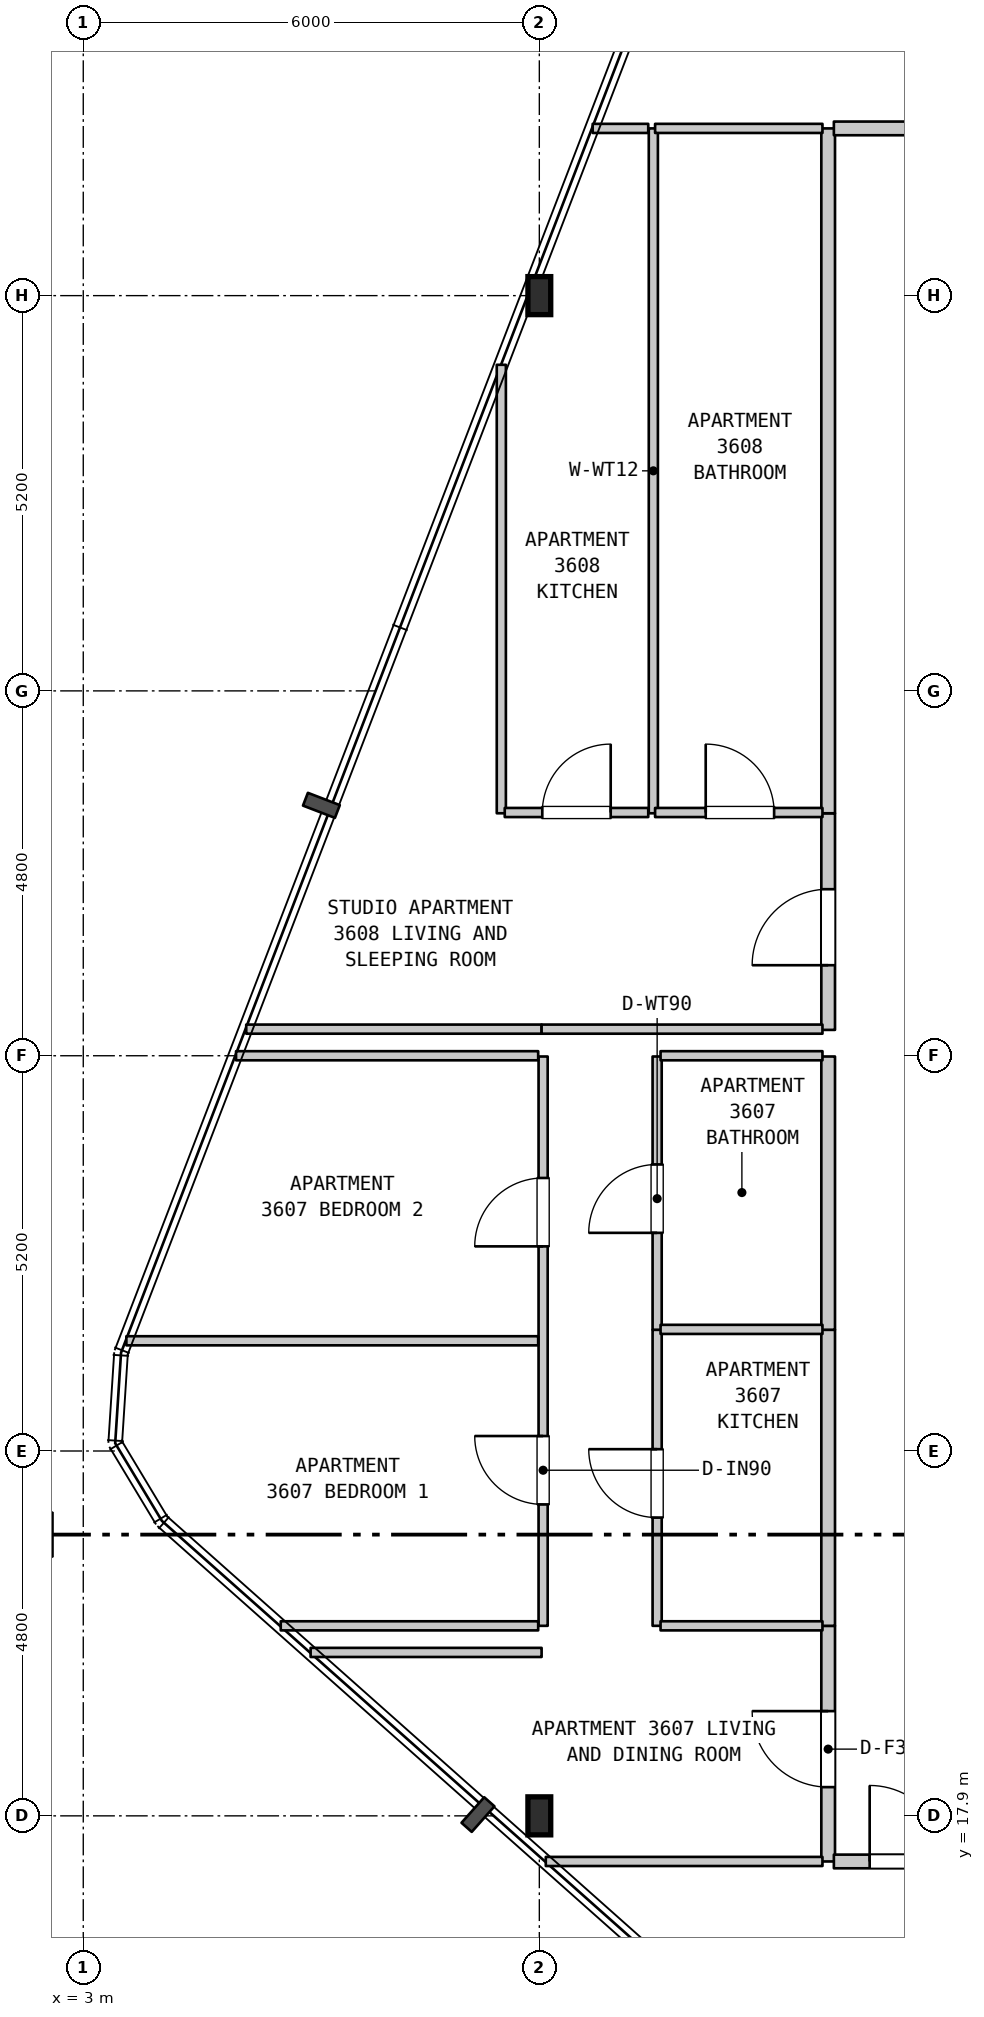
"""IFC4 building model, lengths in metres.
Left out: names, types, materials, properties, quantities, classifications, styles, units other than length and angle.
Written with IfcOpenShell. Run it as: python <this file> out.ifc"""

import sys

from ifc_helpers import new_model, si_unit, direction, frame, frame_2d, origin, origin_2d, place, context, subcontext, project, spatial, rectangle, i_section, extrude, element, fill, save


model = new_model("IFC4")
c1 = context("Model", 3, precision=1e-05, world=origin(), true_north=direction((0.0, 1.0)))
c2 = subcontext(c1, "Body", "Model", "MODEL_VIEW")
j1 = project(units=[si_unit("LENGTHUNIT", "METRE"), si_unit("PLANEANGLEUNIT", "RADIAN")], contexts=[c1])
p1 = place(None, origin())
s1 = spatial("IfcSite", under=j1, at=p1, CompositionType="ELEMENT")
p2 = place(p1, origin())
s2 = spatial("IfcBuilding", under=s1, at=p2, CompositionType="ELEMENT")
p3 = place(p2, frame((0.0, 0.0, 148.3)))
s3 = spatial("IfcBuildingStorey", under=s2, at=p3, CompositionType="ELEMENT", Elevation=148.3)
for number, where, z_axis, x_axis in (
    (1, (9.0, 17.9, 0.0), (0.0, 0.0, 1.0), (1.0, 0.0, 0.0)),
    (2, (9.0, 37.9, 0.0), (0.0, 0.0, 1.0), (1.0, 0.0, 0.0)),
):
    element("IfcColumn", number, at=place(p3, frame(where, z_axis=z_axis, x_axis=x_axis)), inside=s3, PredefinedType="COLUMN", context=c2, shape_type="SweptSolid", body=[
        extrude(i_section(OverallWidth=0.3, OverallDepth=0.5, WebThickness=0.014, FlangeThickness=0.028, FilletRadius=0.027, at=origin_2d()), origin(), (0.0, 0.0, 1.0), 3.7),
    ])
p4 = place(p3, frame((8.5, 31.09, 0.0), z_axis=(0.0, 0.0, 1.0), x_axis=(0.0, 1.0, 0.0)))
e3 = element("IfcWall", 3, at=p4, inside=s3, PredefinedType="PARTITIONING", context=c2, shape_type="SweptSolid", body=[
    extrude(rectangle(XDim=5.9, YDim=0.12, at=frame_2d((2.95, 0.0))), origin(), (0.0, 0.0, 1.0), 3.385),
])
p5 = place(p3, frame((9.05, 20.4, 0.0), z_axis=(0.0, 0.0, 1.0), x_axis=(0.0, 1.0, 0.0)))
e4 = element("IfcWall", 4, at=p5, inside=s3, PredefinedType="PARTITIONING", context=c2, shape_type="SweptSolid", body=[
    extrude(rectangle(XDim=7.49, YDim=0.12, at=frame_2d((3.745, 0.0))), origin(), (0.0, 0.0, 1.0), 2.785),
])
p6 = place(p5, frame((1.597, 0.0, 0.0)))
e5 = element("IfcOpeningElement", 5, at=p6, cuts=e4, PredefinedType="OPENING", context=c2, shape_type="SweptSolid", body=[
    extrude(rectangle(XDim=0.9, YDim=2.15, at=frame_2d((0.45, 1.075))), frame((0.0, 0.07, 0.0), z_axis=(0.0, -1.0, 0.0), x_axis=(1.0, 0.0, 0.0)), (0.0, 0.0, 1.0), 0.14),
])
p7 = place(p5, frame((4.992, 0.0, 0.0)))
e6 = element("IfcOpeningElement", 6, at=p7, cuts=e4, PredefinedType="OPENING", context=c2, shape_type="SweptSolid", body=[
    extrude(rectangle(XDim=0.9, YDim=2.15, at=frame_2d((0.45, 1.075))), frame((0.0, 0.07, 0.0), z_axis=(0.0, -1.0, 0.0), x_axis=(1.0, 0.0, 0.0)), (0.0, 0.0, 1.0), 0.14),
])
p8 = place(p3, frame((10.5, 31.09, 0.0), z_axis=(0.0, 0.0, 1.0), x_axis=(0.0, 1.0, 0.0)))
e7 = element("IfcWall", 7, at=p8, inside=s3, PredefinedType="PARTITIONING", context=c2, shape_type="SweptSolid", body=[
    extrude(rectangle(XDim=9.01, YDim=0.12, at=frame_2d((4.505, 0.0))), origin(), (0.0, 0.0, 1.0), 3.385),
])
p9 = place(p3, frame((10.55, 20.4, 0.0), z_axis=(0.0, 0.0, 1.0), x_axis=(0.0, 1.0, 0.0)))
e8 = element("IfcWall", 8, at=p9, inside=s3, PredefinedType="PARTITIONING", context=c2, shape_type="SweptSolid", body=[
    extrude(rectangle(XDim=3.895, YDim=0.12, at=frame_2d((1.948, 0.0))), origin(), (0.0, 0.0, 1.0), 3.385),
])
p10 = place(p9, frame((1.424, 0.0, 0.0)))
e9 = element("IfcOpeningElement", 9, at=p10, cuts=e8, PredefinedType="OPENING", context=c2, shape_type="SweptSolid", body=[
    extrude(rectangle(XDim=0.9, YDim=2.15, at=frame_2d((0.45, 1.075))), frame((0.0, 0.07, 0.0), z_axis=(0.0, -1.0, 0.0), x_axis=(1.0, 0.0, 0.0)), (0.0, 0.0, 1.0), 0.14),
])
p11 = place(p3, frame((10.55, 24.295, 0.0), z_axis=(0.0, 0.0, 1.0), x_axis=(0.0, 1.0, 0.0)))
e10 = element("IfcWall", 10, at=p11, inside=s3, PredefinedType="PARTITIONING", context=c2, shape_type="SweptSolid", body=[
    extrude(rectangle(XDim=3.595, YDim=0.12, at=frame_2d((1.797, 0.0))), origin(), (0.0, 0.0, 1.0), 3.385),
])
p12 = place(p11, frame((1.275, 0.0, 0.0)))
e11 = element("IfcOpeningElement", 11, at=p12, cuts=e10, PredefinedType="OPENING", context=c2, shape_type="SweptSolid", body=[
    extrude(rectangle(XDim=0.9, YDim=2.1, at=frame_2d((0.45, 1.05))), frame((0.0, 0.07, 0.0), z_axis=(0.0, -1.0, 0.0), x_axis=(1.0, 0.0, 0.0)), (0.0, 0.0, 1.0), 0.14),
])
p13 = place(p3, frame((12.8, 17.3, 0.0), z_axis=(0.0, 0.0, 1.0), x_axis=(0.0, 1.0, 0.0)))
e12 = element("IfcWall", 12, at=p13, inside=s3, PredefinedType="STANDARD", context=c2, shape_type="SweptSolid", body=[
    extrude(rectangle(XDim=3.1, YDim=0.18, at=frame_2d((1.55, 0.0))), origin(), (0.0, 0.0, 1.0), 3.385),
])
p14 = place(p13, frame((0.978, 0.0, 0.0)))
e13 = element("IfcOpeningElement", 13, at=p14, cuts=e12, PredefinedType="OPENING", context=c2, shape_type="SweptSolid", body=[
    extrude(rectangle(XDim=1.0, YDim=2.15, at=frame_2d((0.5, 1.075))), frame((0.0, 0.1, 0.0), z_axis=(0.0, -1.0, 0.0), x_axis=(1.0, 0.0, 0.0)), (0.0, 0.0, 1.0), 0.2),
])
p15 = place(p3, frame((12.8, 20.4, 0.0), z_axis=(0.0, 0.0, 1.0), x_axis=(0.0, 1.0, 0.0)))
e14 = element("IfcWall", 14, at=p15, inside=s3, PredefinedType="STANDARD", context=c2, shape_type="SweptSolid", body=[
    extrude(rectangle(XDim=3.895, YDim=0.18, at=frame_2d((1.948, 0.0))), origin(), (0.0, 0.0, 1.0), 3.385),
])
p16 = place(p3, frame((12.8, 24.295, 0.0), z_axis=(0.0, 0.0, 1.0), x_axis=(0.0, 1.0, 0.0)))
e15 = element("IfcWall", 15, at=p16, inside=s3, PredefinedType="STANDARD", context=c2, shape_type="SweptSolid", body=[
    extrude(rectangle(XDim=3.595, YDim=0.18, at=frame_2d((1.797, 0.0))), origin(), (0.0, 0.0, 1.0), 3.385),
])
p17 = place(p3, frame((12.8, 28.24, 0.0), z_axis=(0.0, 0.0, 1.0), x_axis=(0.0, 1.0, 0.0)))
e16 = element("IfcWall", 16, at=p17, inside=s3, PredefinedType="STANDARD", context=c2, shape_type="SweptSolid", body=[
    extrude(rectangle(XDim=2.85, YDim=0.18, at=frame_2d((1.425, 0.0))), origin(), (0.0, 0.0, 1.0), 3.385),
])
p18 = place(p17, frame((0.851, 0.0, 0.0)))
e17 = element("IfcOpeningElement", 17, at=p18, cuts=e16, PredefinedType="OPENING", context=c2, shape_type="SweptSolid", body=[
    extrude(rectangle(XDim=1.0, YDim=2.15, at=frame_2d((0.5, 1.075))), frame((0.0, 0.1, 0.0), z_axis=(0.0, -1.0, 0.0), x_axis=(1.0, 0.0, 0.0)), (0.0, 0.0, 1.0), 0.2),
])
p19 = place(p3, frame((12.8, 31.09, 0.0), z_axis=(0.0, 0.0, 1.0), x_axis=(0.0, 1.0, 0.0)))
e18 = element("IfcWall", 18, at=p19, inside=s3, PredefinedType="STANDARD", context=c2, shape_type="SweptSolid", body=[
    extrude(rectangle(XDim=9.01, YDim=0.18, at=frame_2d((4.505, 0.0))), origin(), (0.0, 0.0, 1.0), 3.385),
])
p20 = place(p3, frame((9.085, 17.3, 0.0), z_axis=(0.0, 0.0, 1.0), x_axis=(1.0, 0.0, 0.0)))
e19 = element("IfcWall", 19, at=p20, inside=s3, PredefinedType="PARTITIONING", context=c2, shape_type="SweptSolid", body=[
    extrude(rectangle(XDim=3.64, YDim=0.12, at=frame_2d((1.82, 0.0))), origin(), (0.0, 0.0, 1.0), 3.385),
])
p21 = place(p3, frame((12.875, 17.3, 0.0), z_axis=(0.0, 0.0, 1.0), x_axis=(1.0, 0.0, 0.0)))
e20 = element("IfcWall", 20, at=p21, inside=s3, PredefinedType="STANDARD", context=c2, shape_type="SweptSolid", body=[
    extrude(rectangle(XDim=3.28, YDim=0.18, at=frame_2d((1.64, 0.0))), origin(), (0.0, 0.0, 1.0), 3.385),
])
p22 = place(p21, frame((0.471, 0.0, 0.0)))
e21 = element("IfcOpeningElement", 21, at=p22, cuts=e20, PredefinedType="OPENING", context=c2, shape_type="SweptSolid", body=[
    extrude(rectangle(XDim=1.0, YDim=2.15, at=frame_2d((0.5, 1.075))), frame((0.0, 0.1, 0.0), z_axis=(0.0, -1.0, 0.0), x_axis=(1.0, 0.0, 0.0)), (0.0, 0.0, 1.0), 0.2),
])
p23 = place(p3, frame((5.991, 20.05, 0.0), z_axis=(0.0, 0.0, 1.0), x_axis=(1.0, 0.0, 0.0)))
e22 = element("IfcWall", 22, at=p23, inside=s3, PredefinedType="PARTITIONING", context=c2, shape_type="SweptSolid", body=[
    extrude(rectangle(XDim=3.039, YDim=0.12, at=frame_2d((1.52, 0.0))), origin(), (0.0, 0.0, 1.0), 3.385),
])
p24 = place(p3, frame((5.598, 20.4, 0.0), z_axis=(0.0, 0.0, 1.0), x_axis=(1.0, 0.0, 0.0)))
e23 = element("IfcWall", 23, at=p24, inside=s3, PredefinedType="PARTITIONING", context=c2, shape_type="SweptSolid", body=[
    extrude(rectangle(XDim=3.387, YDim=0.12, at=frame_2d((1.694, 0.0))), origin(), (0.0, 0.0, 1.0), 3.385),
])
p25 = place(p3, frame((10.595, 20.4, 0.0), z_axis=(0.0, 0.0, 1.0), x_axis=(1.0, 0.0, 0.0)))
e24 = element("IfcWall", 24, at=p25, inside=s3, PredefinedType="PARTITIONING", context=c2, shape_type="SweptSolid", body=[
    extrude(rectangle(XDim=2.13, YDim=0.12, at=frame_2d((1.065, 0.0))), origin(), (0.0, 0.0, 1.0), 3.385),
])
p26 = place(p3, frame((3.567, 24.15, 0.0), z_axis=(0.0, 0.0, 1.0), x_axis=(1.0, 0.0, 0.0)))
e25 = element("IfcWall", 25, at=p26, inside=s3, PredefinedType="PARTITIONING", context=c2, shape_type="SweptSolid", body=[
    extrude(rectangle(XDim=5.418, YDim=0.12, at=frame_2d((2.709, 0.0))), origin(), (0.0, 0.0, 1.0), 3.385),
])
p27 = place(p3, frame((10.595, 24.3, 0.0), z_axis=(0.0, 0.0, 1.0), x_axis=(1.0, 0.0, 0.0)))
e26 = element("IfcWall", 26, at=p27, inside=s3, PredefinedType="PARTITIONING", context=c2, shape_type="SweptSolid", body=[
    extrude(rectangle(XDim=2.13, YDim=0.12, at=frame_2d((1.065, 0.0))), origin(), (0.0, 0.0, 1.0), 3.385),
])
p28 = place(p3, frame((5.01, 27.9, 0.0), z_axis=(0.0, 0.0, 1.0), x_axis=(1.0, 0.0, 0.0)))
e27 = element("IfcWall", 27, at=p28, inside=s3, PredefinedType="PARTITIONING", context=c2, shape_type="SweptSolid", body=[
    extrude(rectangle(XDim=3.975, YDim=0.12, at=frame_2d((1.988, 0.0))), origin(), (0.0, 0.0, 1.0), 3.385),
])
p29 = place(p3, frame((10.595, 27.9, 0.0), z_axis=(0.0, 0.0, 1.0), x_axis=(1.0, 0.0, 0.0)))
e28 = element("IfcWall", 28, at=p29, inside=s3, PredefinedType="PARTITIONING", context=c2, shape_type="SweptSolid", body=[
    extrude(rectangle(XDim=2.13, YDim=0.12, at=frame_2d((1.065, 0.0))), origin(), (0.0, 0.0, 1.0), 3.385),
])
p30 = place(p3, frame((5.144, 28.25, 0.0), z_axis=(0.0, 0.0, 1.0), x_axis=(1.0, 0.0, 0.0)))
e29 = element("IfcWall", 29, at=p30, inside=s3, PredefinedType="PARTITIONING", context=c2, shape_type="SweptSolid", body=[
    extrude(rectangle(XDim=3.886, YDim=0.12, at=frame_2d((1.943, 0.0))), origin(), (0.0, 0.0, 1.0), 3.385),
])
p31 = place(p3, frame((9.03, 28.25, 0.0), z_axis=(0.0, 0.0, 1.0), x_axis=(1.0, 0.0, 0.0)))
e30 = element("IfcWall", 30, at=p31, inside=s3, PredefinedType="PARTITIONING", context=c2, shape_type="SweptSolid", body=[
    extrude(rectangle(XDim=3.695, YDim=0.12, at=frame_2d((1.848, 0.0))), origin(), (0.0, 0.0, 1.0), 3.385),
])
p32 = place(p3, frame((8.545, 31.1, 0.0), z_axis=(0.0, 0.0, 1.0), x_axis=(1.0, 0.0, 0.0)))
e31 = element("IfcWall", 31, at=p32, inside=s3, PredefinedType="PARTITIONING", context=c2, shape_type="SweptSolid", body=[
    extrude(rectangle(XDim=1.888, YDim=0.12, at=frame_2d((0.944, 0.0))), origin(), (0.0, 0.0, 1.0), 3.385),
])
p33 = place(p32, frame((0.494, 0.0, 0.0)))
e32 = element("IfcOpeningElement", 32, at=p33, cuts=e31, PredefinedType="OPENING", context=c2, shape_type="SweptSolid", body=[
    extrude(rectangle(XDim=0.9, YDim=2.15, at=frame_2d((0.45, 1.075))), frame((0.0, 0.07, 0.0), z_axis=(0.0, -1.0, 0.0), x_axis=(1.0, 0.0, 0.0)), (0.0, 0.0, 1.0), 0.14),
])
p34 = place(p3, frame((10.523, 31.1, 0.0), z_axis=(0.0, 0.0, 1.0), x_axis=(1.0, 0.0, 0.0)))
e33 = element("IfcWall", 33, at=p34, inside=s3, PredefinedType="PARTITIONING", context=c2, shape_type="SweptSolid", body=[
    extrude(rectangle(XDim=2.202, YDim=0.12, at=frame_2d((1.101, 0.0))), origin(), (0.0, 0.0, 1.0), 3.385),
])
p35 = place(p34, frame((0.666, 0.0, 0.0)))
e34 = element("IfcOpeningElement", 34, at=p35, cuts=e33, PredefinedType="OPENING", context=c2, shape_type="SweptSolid", body=[
    extrude(rectangle(XDim=0.9, YDim=2.1, at=frame_2d((0.45, 1.05))), frame((0.0, 0.07, 0.0), z_axis=(0.0, -1.0, 0.0), x_axis=(1.0, 0.0, 0.0)), (0.0, 0.0, 1.0), 0.14),
])
p36 = place(p3, frame((9.702, 40.1, 0.0), z_axis=(0.0, 0.0, 1.0), x_axis=(1.0, 0.0, 0.0)))
e35 = element("IfcWall", 35, at=p36, inside=s3, PredefinedType="PARTITIONING", context=c2, shape_type="SweptSolid", body=[
    extrude(rectangle(XDim=0.731, YDim=0.12, at=frame_2d((0.366, 0.0))), origin(), (0.0, 0.0, 1.0), 3.385),
])
p37 = place(p3, frame((10.523, 40.1, 0.0), z_axis=(0.0, 0.0, 1.0), x_axis=(1.0, 0.0, 0.0)))
e36 = element("IfcWall", 36, at=p37, inside=s3, PredefinedType="PARTITIONING", context=c2, shape_type="SweptSolid", body=[
    extrude(rectangle(XDim=2.202, YDim=0.12, at=frame_2d((1.101, 0.0))), origin(), (0.0, 0.0, 1.0), 3.385),
])
p38 = place(p3, frame((12.875, 40.1, 0.0), z_axis=(0.0, 0.0, 1.0), x_axis=(1.0, 0.0, 0.0)))
e37 = element("IfcWall", 37, at=p38, inside=s3, PredefinedType="STANDARD", context=c2, shape_type="SweptSolid", body=[
    extrude(rectangle(XDim=1.48, YDim=0.18, at=frame_2d((0.74, 0.0))), origin(), (0.0, 0.0, 1.0), 3.385),
])
p39 = place(p6, origin())
e38 = element("IfcDoor", 38, at=p39, inside=s3, OperationType="SINGLE_SWING_RIGHT", PredefinedType="DOOR", context=c2, shape_type="SweptSolid", body=[
    extrude(rectangle(XDim=0.9, YDim=2.15, at=frame_2d((0.45, 1.075))), frame((0.0, 0.025, 0.0), z_axis=(0.0, -1.0, 0.0), x_axis=(1.0, 0.0, 0.0)), (0.0, 0.0, 1.0), 0.05),
])
fill(e5, e38)
p40 = place(p7, origin())
e39 = element("IfcDoor", 39, at=p40, inside=s3, OperationType="SINGLE_SWING_LEFT", PredefinedType="DOOR", context=c2, shape_type="SweptSolid", body=[
    extrude(rectangle(XDim=0.9, YDim=2.15, at=frame_2d((0.45, 1.075))), frame((0.0, 0.025, 0.0), z_axis=(0.0, -1.0, 0.0), x_axis=(1.0, 0.0, 0.0)), (0.0, 0.0, 1.0), 0.05),
])
fill(e6, e39)
p41 = place(p10, origin())
e40 = element("IfcDoor", 40, at=p41, inside=s3, OperationType="SINGLE_SWING_RIGHT", PredefinedType="DOOR", context=c2, shape_type="SweptSolid", body=[
    extrude(rectangle(XDim=0.9, YDim=2.15, at=frame_2d((0.45, 1.075))), frame((0.0, 0.025, 0.0), z_axis=(0.0, -1.0, 0.0), x_axis=(1.0, 0.0, 0.0)), (0.0, 0.0, 1.0), 0.05),
])
fill(e9, e40)
p42 = place(p12, origin())
e41 = element("IfcDoor", 41, at=p42, inside=s3, OperationType="SINGLE_SWING_LEFT", PredefinedType="DOOR", context=c2, shape_type="SweptSolid", body=[
    extrude(rectangle(XDim=0.9, YDim=2.1, at=frame_2d((0.45, 1.05))), frame((0.0, 0.025, 0.0), z_axis=(0.0, -1.0, 0.0), x_axis=(1.0, 0.0, 0.0)), (0.0, 0.0, 1.0), 0.05),
])
fill(e11, e41)
p43 = place(p14, origin())
e42 = element("IfcDoor", 42, at=p43, inside=s3, OperationType="SINGLE_SWING_RIGHT", PredefinedType="DOOR", context=c2, shape_type="SweptSolid", body=[
    extrude(rectangle(XDim=1.0, YDim=2.15, at=frame_2d((0.5, 1.075))), frame((0.0, 0.025, 0.0), z_axis=(0.0, -1.0, 0.0), x_axis=(1.0, 0.0, 0.0)), (0.0, 0.0, 1.0), 0.05),
])
fill(e13, e42)
p44 = place(p18, origin())
e43 = element("IfcDoor", 43, at=p44, inside=s3, OperationType="SINGLE_SWING_LEFT", PredefinedType="DOOR", context=c2, shape_type="SweptSolid", body=[
    extrude(rectangle(XDim=1.0, YDim=2.15, at=frame_2d((0.5, 1.075))), frame((0.0, 0.025, 0.0), z_axis=(0.0, -1.0, 0.0), x_axis=(1.0, 0.0, 0.0)), (0.0, 0.0, 1.0), 0.05),
])
fill(e17, e43)
p45 = place(p22, origin())
e44 = element("IfcDoor", 44, at=p45, inside=s3, OperationType="SINGLE_SWING_LEFT", PredefinedType="DOOR", context=c2, shape_type="SweptSolid", body=[
    extrude(rectangle(XDim=1.0, YDim=2.15, at=frame_2d((0.5, 1.075))), frame((0.0, 0.025, 0.0), z_axis=(0.0, -1.0, 0.0), x_axis=(1.0, 0.0, 0.0)), (0.0, 0.0, 1.0), 0.05),
])
fill(e21, e44)
p46 = place(p33, origin())
e45 = element("IfcDoor", 45, at=p46, inside=s3, OperationType="SINGLE_SWING_RIGHT", PredefinedType="DOOR", context=c2, shape_type="SweptSolid", body=[
    extrude(rectangle(XDim=0.9, YDim=2.15, at=frame_2d((0.45, 1.075))), frame((0.0, 0.025, 0.0), z_axis=(0.0, -1.0, 0.0), x_axis=(1.0, 0.0, 0.0)), (0.0, 0.0, 1.0), 0.05),
])
fill(e32, e45)
p47 = place(p35, origin())
e46 = element("IfcDoor", 46, at=p47, inside=s3, OperationType="SINGLE_SWING_LEFT", PredefinedType="DOOR", context=c2, shape_type="SweptSolid", body=[
    extrude(rectangle(XDim=0.9, YDim=2.1, at=frame_2d((0.45, 1.05))), frame((0.0, 0.025, 0.0), z_axis=(0.0, -1.0, 0.0), x_axis=(1.0, 0.0, 0.0)), (0.0, 0.0, 1.0), 0.05),
])
fill(e34, e46)
save(model, sys.argv[1])
